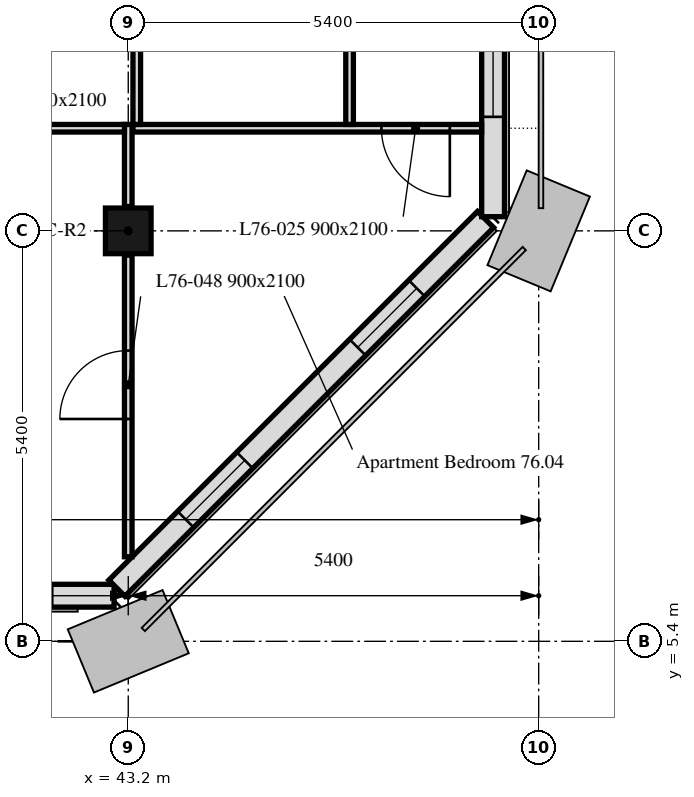
"""IFC4 building model, lengths in metres.
Left out: names, types, materials, properties, quantities, classifications, styles, units other than length and angle.
Written with IfcOpenShell. Run it as: python <this file> out.ifc"""

import sys

from ifc_helpers import new_model, si_unit, direction, frame, frame_2d, origin, origin_2d, place, context, subcontext, project, spatial, rectangle, extrude, element, fill, save


model = new_model("IFC4")
c1 = context("Model", 3, precision=1e-05, world=origin(), true_north=direction((0.0, 1.0)))
c2 = subcontext(c1, "Body", "Model", "MODEL_VIEW")
j1 = project(units=[si_unit("LENGTHUNIT", "METRE"), si_unit("PLANEANGLEUNIT", "RADIAN")], contexts=[c1])
p1 = place(None, origin())
s1 = spatial("IfcSite", under=j1, at=p1, CompositionType="ELEMENT")
p2 = place(p1, origin())
s2 = spatial("IfcBuilding", under=s1, at=p2, CompositionType="ELEMENT")
p3 = place(p2, frame((0.0, 0.0, 304.9)))
s3 = spatial("IfcBuildingStorey", under=s2, at=p3, CompositionType="ELEMENT", Elevation=304.9)
p4 = place(p3, frame((43.2, 10.8, 0.0), z_axis=(0.0, 0.0, 1.0), x_axis=(1.0, 0.0, 0.0)))
e1 = element("IfcColumn", 1, at=p4, inside=s3, PredefinedType="COLUMN", context=c2, shape_type="SweptSolid", body=[
    extrude(rectangle(XDim=0.6, YDim=0.6, at=origin_2d()), origin(), (0.0, 0.0, 1.0), 2.8),
])
p5 = place(p3, frame((10.986, 6.0, 0.0), z_axis=(0.0, 0.0, 1.0), x_axis=(1.0, 0.0, 0.0)))
e2 = element("IfcWall", 2, at=p5, inside=s3, PredefinedType="SOLIDWALL", context=c2, shape_type="SweptSolid", body=[
    extrude(rectangle(XDim=32.027, YDim=0.3, at=frame_2d((16.014, 0.0))), origin(), (0.0, 0.0, 1.0), 2.8),
])
p6 = place(p5, frame((2.764, 0.0, 0.9)))
e3 = element("IfcOpeningElement", 3, at=p6, cuts=e2, PredefinedType="OPENING", context=c2, shape_type="SweptSolid", body=[
    extrude(rectangle(XDim=1.1, YDim=1.7, at=frame_2d((0.55, 0.85))), frame((0.0, 0.16, 0.0), z_axis=(0.0, -1.0, 0.0), x_axis=(1.0, 0.0, 0.0)), (0.0, 0.0, 1.0), 0.32),
])
p7 = place(p5, frame((6.214, 0.0, 0.9)))
e4 = element("IfcOpeningElement", 4, at=p7, cuts=e2, PredefinedType="OPENING", context=c2, shape_type="SweptSolid", body=[
    extrude(rectangle(XDim=3.4, YDim=1.7, at=frame_2d((1.7, 0.85))), frame((0.0, 0.16, 0.0), z_axis=(0.0, -1.0, 0.0), x_axis=(1.0, 0.0, 0.0)), (0.0, 0.0, 1.0), 0.32),
])
p8 = place(p5, frame((13.564, 0.0, 0.9)))
e5 = element("IfcOpeningElement", 5, at=p8, cuts=e2, PredefinedType="OPENING", context=c2, shape_type="SweptSolid", body=[
    extrude(rectangle(XDim=1.1, YDim=1.7, at=frame_2d((0.55, 0.85))), frame((0.0, 0.16, 0.0), z_axis=(0.0, -1.0, 0.0), x_axis=(1.0, 0.0, 0.0)), (0.0, 0.0, 1.0), 0.32),
])
p9 = place(p5, frame((17.014, 0.0, 0.9)))
e6 = element("IfcOpeningElement", 6, at=p9, cuts=e2, PredefinedType="OPENING", context=c2, shape_type="SweptSolid", body=[
    extrude(rectangle(XDim=3.4, YDim=1.7, at=frame_2d((1.7, 0.85))), frame((0.0, 0.16, 0.0), z_axis=(0.0, -1.0, 0.0), x_axis=(1.0, 0.0, 0.0)), (0.0, 0.0, 1.0), 0.32),
])
p10 = place(p5, frame((24.364, 0.0, 0.9)))
e7 = element("IfcOpeningElement", 7, at=p10, cuts=e2, PredefinedType="OPENING", context=c2, shape_type="SweptSolid", body=[
    extrude(rectangle(XDim=1.1, YDim=1.7, at=frame_2d((0.55, 0.85))), frame((0.0, 0.16, 0.0), z_axis=(0.0, -1.0, 0.0), x_axis=(1.0, 0.0, 0.0)), (0.0, 0.0, 1.0), 0.32),
])
p11 = place(p5, frame((27.814, 0.0, 0.9)))
e8 = element("IfcOpeningElement", 8, at=p11, cuts=e2, PredefinedType="OPENING", context=c2, shape_type="SweptSolid", body=[
    extrude(rectangle(XDim=3.4, YDim=1.7, at=frame_2d((1.7, 0.85))), frame((0.0, 0.16, 0.0), z_axis=(0.0, -1.0, 0.0), x_axis=(1.0, 0.0, 0.0)), (0.0, 0.0, 1.0), 0.32),
])
p12 = place(p3, frame((43.051, 6.099, 0.0), z_axis=(0.0, 0.0, 1.0), x_axis=(0.707106781187, 0.707106781187, 0.0)))
e9 = element("IfcWall", 9, at=p12, inside=s3, PredefinedType="SOLIDWALL", context=c2, shape_type="SweptSolid", body=[
    extrude(rectangle(XDim=6.86, YDim=0.3, at=frame_2d((3.43, 0.0))), origin(), (0.0, 0.0, 1.0), 2.8),
])
p13 = place(p12, frame((1.28, 0.0, 0.9)))
e10 = element("IfcOpeningElement", 10, at=p13, cuts=e9, PredefinedType="OPENING", context=c2, shape_type="SweptSolid", body=[
    extrude(rectangle(XDim=1.1, YDim=1.7, at=frame_2d((0.55, 0.85))), frame((0.0, 0.16, 0.0), z_axis=(0.0, -1.0, 0.0), x_axis=(1.0, 0.0, 0.0)), (0.0, 0.0, 1.0), 0.32),
])
p14 = place(p12, frame((4.48, 0.0, 0.9)))
e11 = element("IfcOpeningElement", 11, at=p14, cuts=e9, PredefinedType="OPENING", context=c2, shape_type="SweptSolid", body=[
    extrude(rectangle(XDim=1.1, YDim=1.7, at=frame_2d((0.55, 0.85))), frame((0.0, 0.16, 0.0), z_axis=(0.0, -1.0, 0.0), x_axis=(1.0, 0.0, 0.0)), (0.0, 0.0, 1.0), 0.32),
])
p15 = place(p3, frame((48.0, 10.986, 0.0), z_axis=(0.0, 0.0, 1.0), x_axis=(0.0, 1.0, 0.0)))
e12 = element("IfcWall", 12, at=p15, inside=s3, PredefinedType="SOLIDWALL", context=c2, shape_type="SweptSolid", body=[
    extrude(rectangle(XDim=32.027, YDim=0.3, at=frame_2d((16.014, 0.0))), origin(), (0.0, 0.0, 1.0), 2.8),
])
p16 = place(p15, frame((1.314, 0.0, 0.9)))
e13 = element("IfcOpeningElement", 13, at=p16, cuts=e12, PredefinedType="OPENING", context=c2, shape_type="SweptSolid", body=[
    extrude(rectangle(XDim=1.1, YDim=1.7, at=frame_2d((0.55, 0.85))), frame((0.0, 0.16, 0.0), z_axis=(0.0, -1.0, 0.0), x_axis=(1.0, 0.0, 0.0)), (0.0, 0.0, 1.0), 0.32),
])
p17 = place(p15, frame((2.589, 0.0, 0.9)))
e14 = element("IfcOpeningElement", 14, at=p17, cuts=e12, PredefinedType="OPENING", context=c2, shape_type="SweptSolid", body=[
    extrude(rectangle(XDim=0.65, YDim=1.7, at=frame_2d((0.325, 0.85))), frame((0.0, 0.16, 0.0), z_axis=(0.0, -1.0, 0.0), x_axis=(1.0, 0.0, 0.0)), (0.0, 0.0, 1.0), 0.32),
])
p18 = place(p15, frame((6.214, 0.0, 0.9)))
e15 = element("IfcOpeningElement", 15, at=p18, cuts=e12, PredefinedType="OPENING", context=c2, shape_type="SweptSolid", body=[
    extrude(rectangle(XDim=3.4, YDim=1.7, at=frame_2d((1.7, 0.85))), frame((0.0, 0.16, 0.0), z_axis=(0.0, -1.0, 0.0), x_axis=(1.0, 0.0, 0.0)), (0.0, 0.0, 1.0), 0.32),
])
p19 = place(p15, frame((11.964, 0.0, 0.9)))
e16 = element("IfcOpeningElement", 16, at=p19, cuts=e12, PredefinedType="OPENING", context=c2, shape_type="SweptSolid", body=[
    extrude(rectangle(XDim=1.1, YDim=1.7, at=frame_2d((0.55, 0.85))), frame((0.0, 0.16, 0.0), z_axis=(0.0, -1.0, 0.0), x_axis=(1.0, 0.0, 0.0)), (0.0, 0.0, 1.0), 0.32),
])
p20 = place(p15, frame((13.564, 0.0, 0.9)))
e17 = element("IfcOpeningElement", 17, at=p20, cuts=e12, PredefinedType="OPENING", context=c2, shape_type="SweptSolid", body=[
    extrude(rectangle(XDim=1.1, YDim=1.7, at=frame_2d((0.55, 0.85))), frame((0.0, 0.16, 0.0), z_axis=(0.0, -1.0, 0.0), x_axis=(1.0, 0.0, 0.0)), (0.0, 0.0, 1.0), 0.32),
])
p21 = place(p15, frame((17.014, 0.0, 0.9)))
e18 = element("IfcOpeningElement", 18, at=p21, cuts=e12, PredefinedType="OPENING", context=c2, shape_type="SweptSolid", body=[
    extrude(rectangle(XDim=3.4, YDim=1.7, at=frame_2d((1.7, 0.85))), frame((0.0, 0.16, 0.0), z_axis=(0.0, -1.0, 0.0), x_axis=(1.0, 0.0, 0.0)), (0.0, 0.0, 1.0), 0.32),
])
p22 = place(p15, frame((23.389, 0.0, 0.9)))
e19 = element("IfcOpeningElement", 19, at=p22, cuts=e12, PredefinedType="OPENING", context=c2, shape_type="SweptSolid", body=[
    extrude(rectangle(XDim=0.65, YDim=1.7, at=frame_2d((0.325, 0.85))), frame((0.0, 0.16, 0.0), z_axis=(0.0, -1.0, 0.0), x_axis=(1.0, 0.0, 0.0)), (0.0, 0.0, 1.0), 0.32),
])
p23 = place(p15, frame((24.364, 0.0, 0.9)))
e20 = element("IfcOpeningElement", 20, at=p23, cuts=e12, PredefinedType="OPENING", context=c2, shape_type="SweptSolid", body=[
    extrude(rectangle(XDim=1.1, YDim=1.7, at=frame_2d((0.55, 0.85))), frame((0.0, 0.16, 0.0), z_axis=(0.0, -1.0, 0.0), x_axis=(1.0, 0.0, 0.0)), (0.0, 0.0, 1.0), 0.32),
])
p24 = place(p15, frame((28.164, 0.0, 0.9)))
e21 = element("IfcOpeningElement", 21, at=p24, cuts=e12, PredefinedType="OPENING", context=c2, shape_type="SweptSolid", body=[
    extrude(rectangle(XDim=1.1, YDim=1.7, at=frame_2d((0.55, 0.85))), frame((0.0, 0.16, 0.0), z_axis=(0.0, -1.0, 0.0), x_axis=(1.0, 0.0, 0.0)), (0.0, 0.0, 1.0), 0.32),
])
p25 = place(p15, frame((29.764, 0.0, 0.9)))
e22 = element("IfcOpeningElement", 22, at=p25, cuts=e12, PredefinedType="OPENING", context=c2, shape_type="SweptSolid", body=[
    extrude(rectangle(XDim=1.1, YDim=1.7, at=frame_2d((0.55, 0.85))), frame((0.0, 0.16, 0.0), z_axis=(0.0, -1.0, 0.0), x_axis=(1.0, 0.0, 0.0)), (0.0, 0.0, 1.0), 0.32),
])
p26 = place(p3, frame((43.2, 6.512, 0.0), z_axis=(0.0, 0.0, 1.0), x_axis=(0.0, 1.0, 0.0)))
e23 = element("IfcWall", 23, at=p26, inside=s3, PredefinedType="PARTITIONING", context=c2, shape_type="SweptSolid", body=[
    extrude(rectangle(XDim=3.968, YDim=0.1, at=frame_2d((1.984, 0.0))), origin(), (0.0, 0.0, 1.0), 2.8),
])
p27 = place(p26, frame((1.813, 0.0, 0.0)))
e24 = element("IfcOpeningElement", 24, at=p27, cuts=e23, PredefinedType="OPENING", context=c2, shape_type="SweptSolid", body=[
    extrude(rectangle(XDim=0.9, YDim=2.1, at=frame_2d((0.45, 1.05))), frame((0.0, 0.05, 0.0), z_axis=(0.0, -1.0, 0.0), x_axis=(1.0, 0.0, 0.0)), (0.0, 0.0, 1.0), 0.1),
])
p28 = place(p3, frame((43.2, 11.12, 0.0), z_axis=(0.0, 0.0, 1.0), x_axis=(0.0, 1.0, 0.0)))
e25 = element("IfcWall", 25, at=p28, inside=s3, PredefinedType="PARTITIONING", context=c2, shape_type="SweptSolid", body=[
    extrude(rectangle(XDim=1.08, YDim=0.1, at=frame_2d((0.54, 0.0))), origin(), (0.0, 0.0, 1.0), 2.8),
])
p29 = place(p3, frame((43.15, 12.15, 0.0), z_axis=(0.0, 0.0, 1.0), x_axis=(-1.0, 0.0, 0.0)))
e26 = element("IfcWall", 26, at=p29, inside=s3, PredefinedType="PARTITIONING", context=c2, shape_type="SweptSolid", body=[
    extrude(rectangle(XDim=5.275, YDim=0.1, at=frame_2d((2.637, 0.0))), origin(), (0.0, 0.0, 1.0), 2.8),
])
p30 = place(p29, frame((3.017, 0.0, 0.0)))
e27 = element("IfcOpeningElement", 27, at=p30, cuts=e26, PredefinedType="OPENING", context=c2, shape_type="SweptSolid", body=[
    extrude(rectangle(XDim=0.9, YDim=2.1, at=frame_2d((0.45, 1.05))), frame((0.0, 0.05, 0.0), z_axis=(0.0, -1.0, 0.0), x_axis=(1.0, 0.0, 0.0)), (0.0, 0.0, 1.0), 0.1),
])
p31 = place(p29, frame((1.517, 0.0, 0.0)))
e28 = element("IfcOpeningElement", 28, at=p31, cuts=e26, PredefinedType="OPENING", context=c2, shape_type="SweptSolid", body=[
    extrude(rectangle(XDim=0.9, YDim=2.1, at=frame_2d((0.45, 1.05))), frame((0.0, 0.05, 0.0), z_axis=(0.0, -1.0, 0.0), x_axis=(1.0, 0.0, 0.0)), (0.0, 0.0, 1.0), 0.1),
])
p32 = place(p3, frame((47.849, 12.15, 0.0), z_axis=(0.0, 0.0, 1.0), x_axis=(-1.0, 0.0, 0.0)))
e29 = element("IfcWall", 29, at=p32, inside=s3, PredefinedType="PARTITIONING", context=c2, shape_type="SweptSolid", body=[
    extrude(rectangle(XDim=4.587, YDim=0.1, at=frame_2d((2.293, 0.0))), origin(), (0.0, 0.0, 1.0), 2.8),
])
p33 = place(p32, frame((0.418, 0.0, 0.0)))
e30 = element("IfcOpeningElement", 30, at=p33, cuts=e29, PredefinedType="OPENING", context=c2, shape_type="SweptSolid", body=[
    extrude(rectangle(XDim=0.9, YDim=2.1, at=frame_2d((0.45, 1.05))), frame((0.0, 0.05, 0.0), z_axis=(0.0, -1.0, 0.0), x_axis=(1.0, 0.0, 0.0)), (0.0, 0.0, 1.0), 0.1),
])
p34 = place(p3, frame((43.312, 12.2, 0.0), z_axis=(0.0, 0.0, 1.0), x_axis=(0.0, 1.0, 0.0)))
e31 = element("IfcWall", 31, at=p34, inside=s3, PredefinedType="PARTITIONING", context=c2, shape_type="SweptSolid", body=[
    extrude(rectangle(XDim=2.125, YDim=0.1, at=frame_2d((1.062, 0.0))), origin(), (0.0, 0.0, 1.0), 2.8),
])
p35 = place(p34, frame((0.975, 0.0, 0.0)))
e32 = element("IfcOpeningElement", 32, at=p35, cuts=e31, PredefinedType="OPENING", context=c2, shape_type="SweptSolid", body=[
    extrude(rectangle(XDim=0.9, YDim=2.1, at=frame_2d((0.45, 1.05))), frame((0.0, 0.05, 0.0), z_axis=(0.0, -1.0, 0.0), x_axis=(1.0, 0.0, 0.0)), (0.0, 0.0, 1.0), 0.1),
])
p36 = place(p3, frame((46.112, 12.2, 0.0), z_axis=(0.0, 0.0, 1.0), x_axis=(0.0, 1.0, 0.0)))
e33 = element("IfcWall", 33, at=p36, inside=s3, PredefinedType="PARTITIONING", context=c2, shape_type="SweptSolid", body=[
    extrude(rectangle(XDim=2.125, YDim=0.1, at=frame_2d((1.062, 0.0))), origin(), (0.0, 0.0, 1.0), 2.8),
])
p37 = place(p13, origin())
e34 = element("IfcWindow", 34, at=p37, inside=s3, PartitioningType="SINGLE_PANEL", PredefinedType="WINDOW", context=c2, shape_type="SweptSolid", body=[
    extrude(rectangle(XDim=1.1, YDim=1.7, at=frame_2d((0.55, 0.85))), frame((0.0, 0.03, 0.0), z_axis=(0.0, -1.0, 0.0), x_axis=(1.0, 0.0, 0.0)), (0.0, 0.0, 1.0), 0.06),
])
fill(e10, e34)
p38 = place(p14, origin())
e35 = element("IfcWindow", 35, at=p38, inside=s3, PartitioningType="SINGLE_PANEL", PredefinedType="WINDOW", context=c2, shape_type="SweptSolid", body=[
    extrude(rectangle(XDim=1.1, YDim=1.7, at=frame_2d((0.55, 0.85))), frame((0.0, 0.03, 0.0), z_axis=(0.0, -1.0, 0.0), x_axis=(1.0, 0.0, 0.0)), (0.0, 0.0, 1.0), 0.06),
])
fill(e11, e35)
p39 = place(p16, origin())
e36 = element("IfcWindow", 36, at=p39, inside=s3, PartitioningType="SINGLE_PANEL", PredefinedType="WINDOW", context=c2, shape_type="SweptSolid", body=[
    extrude(rectangle(XDim=1.1, YDim=1.7, at=frame_2d((0.55, 0.85))), frame((0.0, 0.03, 0.0), z_axis=(0.0, -1.0, 0.0), x_axis=(1.0, 0.0, 0.0)), (0.0, 0.0, 1.0), 0.06),
])
fill(e13, e36)
p40 = place(p33, origin())
e37 = element("IfcDoor", 37, at=p40, inside=s3, OperationType="SINGLE_SWING_RIGHT", PredefinedType="DOOR", context=c2, shape_type="SweptSolid", body=[
    extrude(rectangle(XDim=0.9, YDim=2.1, at=frame_2d((0.45, 1.05))), frame((0.0, 0.025, 0.0), z_axis=(0.0, -1.0, 0.0), x_axis=(1.0, 0.0, 0.0)), (0.0, 0.0, 1.0), 0.05),
])
fill(e30, e37)
p41 = place(p27, origin())
e38 = element("IfcDoor", 38, at=p41, inside=s3, OperationType="SINGLE_SWING_LEFT", PredefinedType="DOOR", context=c2, shape_type="SweptSolid", body=[
    extrude(rectangle(XDim=0.9, YDim=2.1, at=frame_2d((0.45, 1.05))), frame((0.0, 0.025, 0.0), z_axis=(0.0, -1.0, 0.0), x_axis=(1.0, 0.0, 0.0)), (0.0, 0.0, 1.0), 0.05),
])
fill(e24, e38)
save(model, sys.argv[1])
